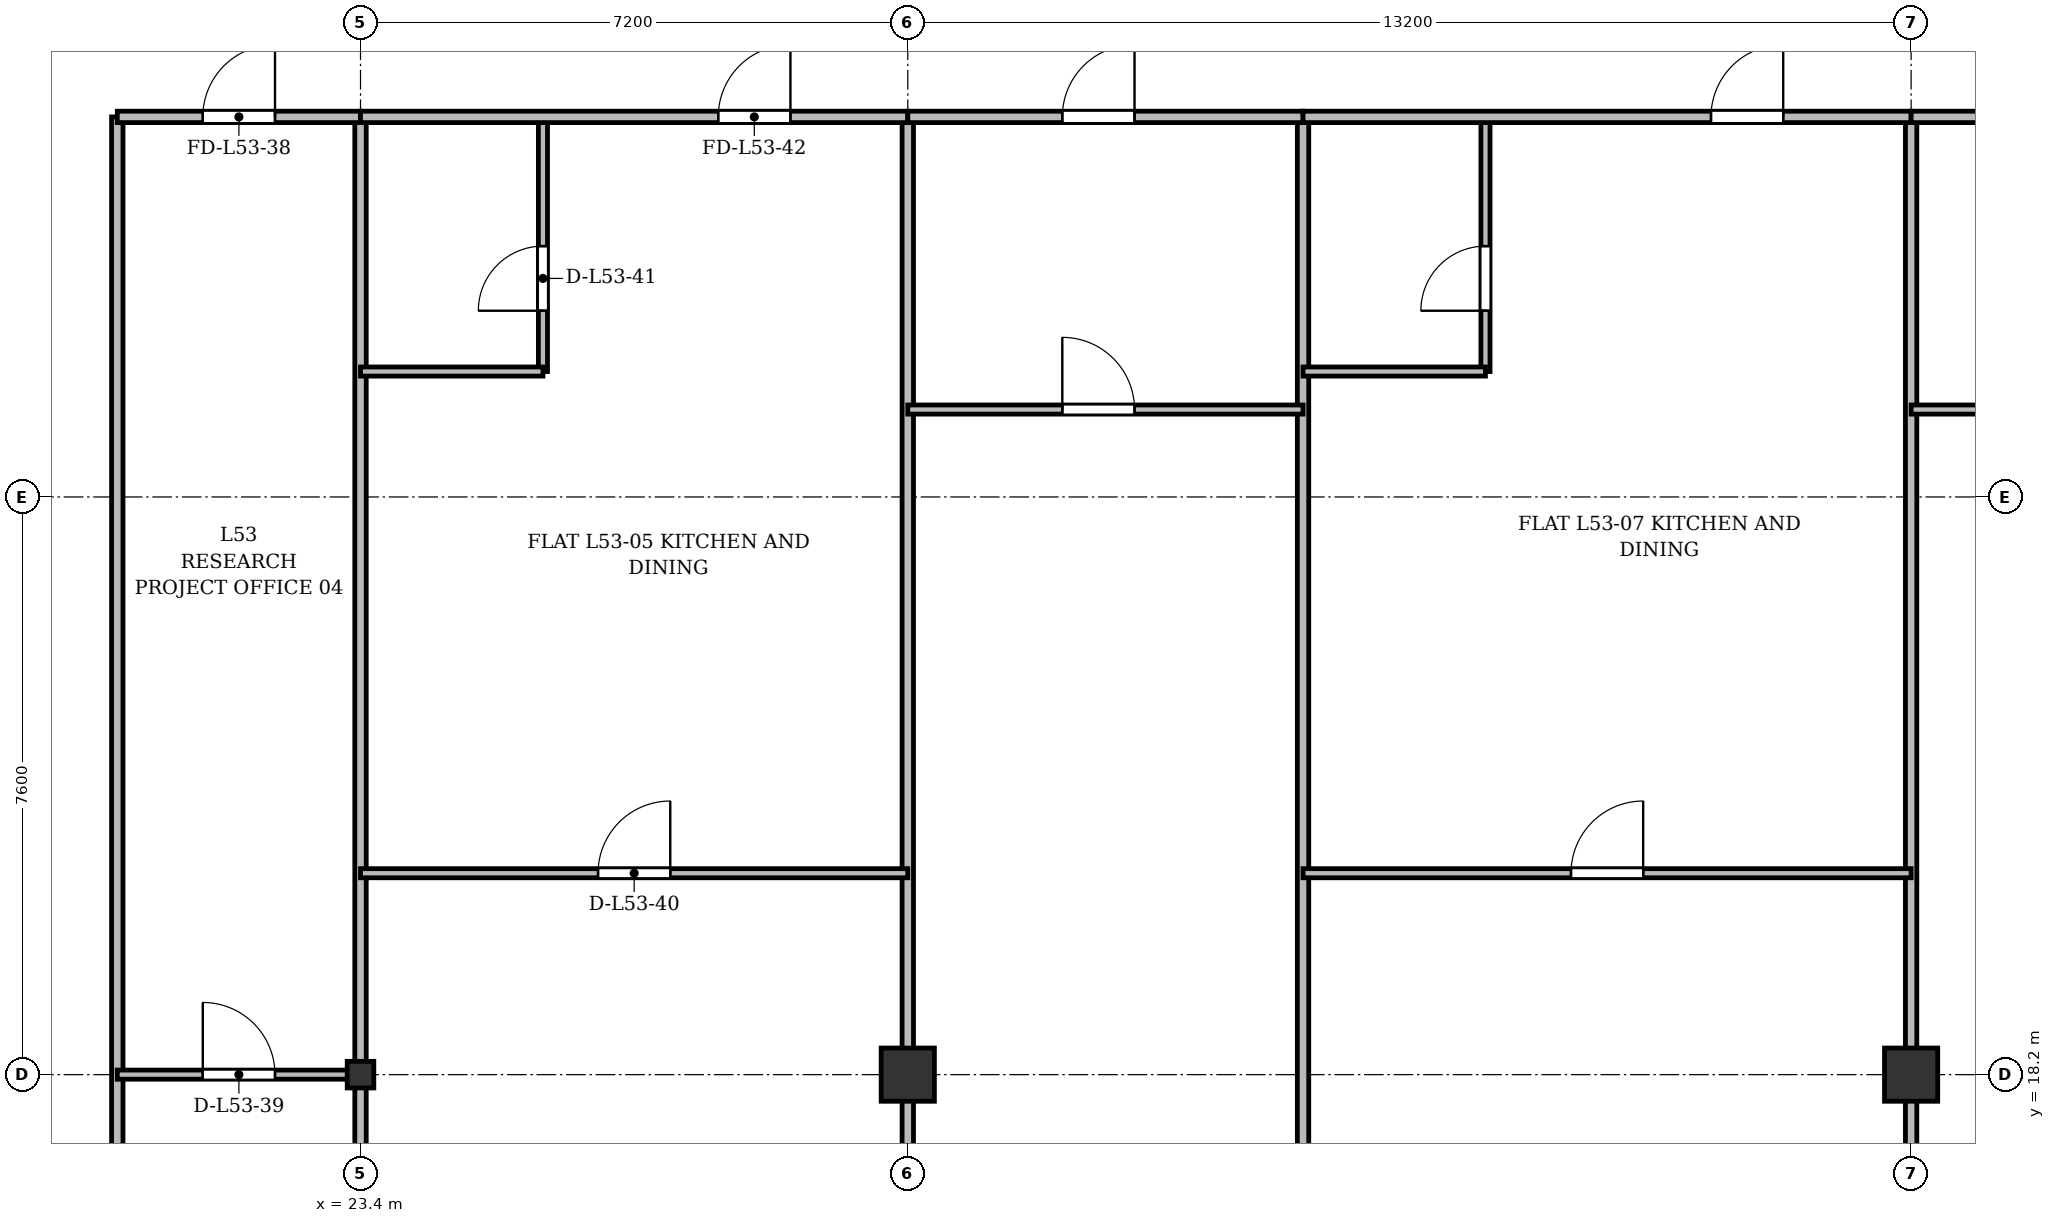
"""IFC4 building model, lengths in metres.
Left out: names, types, materials, properties, quantities, classifications, styles, units other than length and angle.
Written with IfcOpenShell. Run it as: python <this file> out.ifc"""

import sys

from ifc_helpers import new_model, si_unit, direction, frame, frame_2d, origin, origin_2d, place, context, subcontext, project, spatial, rectangle, i_section, extrude, source, transform, mapped, element, fill, save


model = new_model("IFC4")
c1 = context("Model", 3, precision=1e-05, world=origin(), true_north=direction((0.0, 1.0)))
c2 = subcontext(c1, "Body", "Model", "MODEL_VIEW")
j1 = project(units=[si_unit("LENGTHUNIT", "METRE"), si_unit("PLANEANGLEUNIT", "RADIAN")], contexts=[c1])
p1 = place(None, origin())
s1 = spatial("IfcSite", under=j1, at=p1, CompositionType="ELEMENT")
p2 = place(p1, origin())
s2 = spatial("IfcBuilding", under=s1, at=p2, CompositionType="ELEMENT")
p3 = place(p2, frame((0.0, 0.0, 204.9)))
s3 = spatial("IfcBuildingStorey", under=s2, at=p3, CompositionType="ELEMENT", Elevation=204.9)
m1 = source(origin(), c2, "Body", "SweptSolid", [
    extrude(i_section(OverallWidth=0.35, OverallDepth=0.35, WebThickness=0.018, FlangeThickness=0.028, at=origin_2d()), origin(), (0.0, 0.0, 1.0), 3.6),
])
p4 = place(p3, frame((23.4, 18.2, 0.0), z_axis=(0.0, 0.0, 1.0), x_axis=(1.0, 0.0, 0.0)))
e1 = element("IfcColumn", 1, at=p4, inside=s3, PredefinedType="COLUMN", context=c2, shape_type="MappedRepresentation", body=[
    mapped(m1, transform((0.0, 0.0, 0.0), x_axis=(1.0, 0.0, 0.0), y_axis=(0.0, 1.0, 0.0), z_axis=(0.0, 0.0, 1.0), scale=1.0)),
])
m2 = source(origin(), c2, "Body", "SweptSolid", [
    extrude(rectangle(XDim=0.7, YDim=0.7, at=origin_2d()), origin(), (0.0, 0.0, 1.0), 3.6),
])
for number, where, z_axis, x_axis in (
    (2, (30.6, 18.2, 0.0), (0.0, 0.0, 1.0), (1.0, 0.0, 0.0)),
    (3, (43.8, 18.2, 0.0), (0.0, 0.0, 1.0), (1.0, 0.0, 0.0)),
):
    element("IfcColumn", number, at=place(p3, frame(where, z_axis=z_axis, x_axis=x_axis)), inside=s3, PredefinedType="COLUMN", context=c2, shape_type="MappedRepresentation", body=[
        mapped(m2, transform((0.0, 0.0, 0.0), x_axis=(1.0, 0.0, 0.0), y_axis=(0.0, 1.0, 0.0), z_axis=(0.0, 0.0, 1.0), scale=1.0)),
    ])
for number, where, z_axis, x_axis in (
    (4, (23.4, 3.625, 0.0), (0.0, 0.0, 1.0), (0.0, 1.0, 0.0)),
    (5, (30.6, 3.625, 0.0), (0.0, 0.0, 1.0), (0.0, 1.0, 0.0)),
):
    element("IfcWall", number, at=place(p3, frame(where, z_axis=z_axis, x_axis=x_axis)), inside=s3, PredefinedType="PARTITIONING", context=c2, shape_type="SweptSolid", body=[
        extrude(rectangle(XDim=27.175, YDim=0.15, at=frame_2d((13.587, 0.0))), origin(), (0.0, 0.0, 1.0), 2.86),
    ])
p5 = place(p3, frame((35.8, 3.625, 0.0), z_axis=(0.0, 0.0, 1.0), x_axis=(0.0, 1.0, 0.0)))
e6 = element("IfcWall", 6, at=p5, inside=s3, PredefinedType="PARTITIONING", context=c2, shape_type="SweptSolid", body=[
    extrude(rectangle(XDim=27.175, YDim=0.15, at=frame_2d((13.587, 0.0))), origin(), (0.0, 0.0, 1.0), 2.91),
])
p6 = place(p3, frame((43.8, 3.625, 0.0), z_axis=(0.0, 0.0, 1.0), x_axis=(0.0, 1.0, 0.0)))
e7 = element("IfcWall", 7, at=p6, inside=s3, PredefinedType="PARTITIONING", context=c2, shape_type="SweptSolid", body=[
    extrude(rectangle(XDim=27.175, YDim=0.15, at=frame_2d((13.587, 0.0))), origin(), (0.0, 0.0, 1.0), 2.86),
])
p7 = place(p3, frame((20.2, 3.625, 0.0), z_axis=(0.0, 0.0, 1.0), x_axis=(0.0, 1.0, 0.0)))
e8 = element("IfcWall", 8, at=p7, inside=s3, PredefinedType="PARTITIONING", context=c2, shape_type="SweptSolid", body=[
    extrude(rectangle(XDim=27.175, YDim=0.15, at=frame_2d((13.587, 0.0))), origin(), (0.0, 0.0, 1.0), 2.91),
])
p8 = place(p3, frame((20.2, 30.8, 0.0), z_axis=(0.0, 0.0, 1.0), x_axis=(1.0, 0.0, 0.0)))
e9 = element("IfcWall", 9, at=p8, inside=s3, PredefinedType="PARTITIONING", context=c2, shape_type="SweptSolid", body=[
    extrude(rectangle(XDim=3.2, YDim=0.15, at=frame_2d((1.6, 0.0))), origin(), (0.0, 0.0, 1.0), 2.86),
])
p9 = place(p8, frame((1.125, 0.0, 0.0)))
e10 = element("IfcOpeningElement", 10, at=p9, cuts=e9, PredefinedType="OPENING", context=c2, shape_type="SweptSolid", body=[
    extrude(rectangle(XDim=0.95, YDim=2.15, at=frame_2d((0.475, 1.075))), frame((0.0, 0.085, 0.0), z_axis=(0.0, -1.0, 0.0), x_axis=(1.0, 0.0, 0.0)), (0.0, 0.0, 1.0), 0.17),
])
p10 = place(p3, frame((20.2, 18.2, 0.0), z_axis=(0.0, 0.0, 1.0), x_axis=(1.0, 0.0, 0.0)))
e11 = element("IfcWall", 11, at=p10, inside=s3, PredefinedType="PARTITIONING", context=c2, shape_type="SweptSolid", body=[
    extrude(rectangle(XDim=3.2, YDim=0.12, at=frame_2d((1.6, 0.0))), origin(), (0.0, 0.0, 1.0), 2.91),
])
p11 = place(p10, frame((1.125, 0.0, 0.0)))
e12 = element("IfcOpeningElement", 12, at=p11, cuts=e11, PredefinedType="OPENING", context=c2, shape_type="SweptSolid", body=[
    extrude(rectangle(XDim=0.95, YDim=2.15, at=frame_2d((0.475, 1.075))), frame((0.0, 0.07, 0.0), z_axis=(0.0, -1.0, 0.0), x_axis=(1.0, 0.0, 0.0)), (0.0, 0.0, 1.0), 0.14),
])
p12 = place(p3, frame((23.4, 20.85, 0.0), z_axis=(0.0, 0.0, 1.0), x_axis=(1.0, 0.0, 0.0)))
e13 = element("IfcWall", 13, at=p12, inside=s3, PredefinedType="PARTITIONING", context=c2, shape_type="SweptSolid", body=[
    extrude(rectangle(XDim=7.2, YDim=0.12, at=frame_2d((3.6, 0.0))), origin(), (0.0, 0.0, 1.0), 2.86),
])
p13 = place(p12, frame((3.125, 0.0, 0.0)))
e14 = element("IfcOpeningElement", 14, at=p13, cuts=e13, PredefinedType="OPENING", context=c2, shape_type="SweptSolid", body=[
    extrude(rectangle(XDim=0.95, YDim=2.15, at=frame_2d((0.475, 1.075))), frame((0.0, 0.07, 0.0), z_axis=(0.0, -1.0, 0.0), x_axis=(1.0, 0.0, 0.0)), (0.0, 0.0, 1.0), 0.14),
])
p14 = place(p3, frame((25.8, 27.45, 0.0), z_axis=(0.0, 0.0, 1.0), x_axis=(0.0, 1.0, 0.0)))
e15 = element("IfcWall", 15, at=p14, inside=s3, PredefinedType="PARTITIONING", context=c2, shape_type="SweptSolid", body=[
    extrude(rectangle(XDim=3.35, YDim=0.12, at=frame_2d((1.675, 0.0))), origin(), (0.0, 0.0, 1.0), 3.36),
])
p15 = place(p14, frame((0.8, 0.0, 0.0)))
e16 = element("IfcOpeningElement", 16, at=p15, cuts=e15, PredefinedType="OPENING", context=c2, shape_type="SweptSolid", body=[
    extrude(rectangle(XDim=0.85, YDim=2.1, at=frame_2d((0.425, 1.05))), frame((0.0, 0.07, 0.0), z_axis=(0.0, -1.0, 0.0), x_axis=(1.0, 0.0, 0.0)), (0.0, 0.0, 1.0), 0.14),
])
p16 = place(p3, frame((23.4, 27.45, 0.0), z_axis=(0.0, 0.0, 1.0), x_axis=(1.0, 0.0, 0.0)))
e17 = element("IfcWall", 17, at=p16, inside=s3, PredefinedType="PARTITIONING", context=c2, shape_type="SweptSolid", body=[
    extrude(rectangle(XDim=2.4, YDim=0.12, at=frame_2d((1.2, 0.0))), origin(), (0.0, 0.0, 1.0), 2.86),
])
p17 = place(p3, frame((23.4, 30.8, 0.0), z_axis=(0.0, 0.0, 1.0), x_axis=(1.0, 0.0, 0.0)))
e18 = element("IfcWall", 18, at=p17, inside=s3, PredefinedType="PARTITIONING", context=c2, shape_type="SweptSolid", body=[
    extrude(rectangle(XDim=7.2, YDim=0.15, at=frame_2d((3.6, 0.0))), origin(), (0.0, 0.0, 1.0), 2.86),
])
p18 = place(p17, frame((4.706, 0.0, 0.0)))
e19 = element("IfcOpeningElement", 19, at=p18, cuts=e18, PredefinedType="OPENING", context=c2, shape_type="SweptSolid", body=[
    extrude(rectangle(XDim=0.95, YDim=2.15, at=frame_2d((0.475, 1.075))), frame((0.0, 0.085, 0.0), z_axis=(0.0, -1.0, 0.0), x_axis=(1.0, 0.0, 0.0)), (0.0, 0.0, 1.0), 0.17),
])
p19 = place(p3, frame((30.6, 30.8, 0.0), z_axis=(0.0, 0.0, 1.0), x_axis=(1.0, 0.0, 0.0)))
e20 = element("IfcWall", 20, at=p19, inside=s3, PredefinedType="PARTITIONING", context=c2, shape_type="SweptSolid", body=[
    extrude(rectangle(XDim=5.2, YDim=0.15, at=frame_2d((2.6, 0.0))), origin(), (0.0, 0.0, 1.0), 2.86),
])
p20 = place(p19, frame((2.033, 0.0, 0.0)))
e21 = element("IfcOpeningElement", 21, at=p20, cuts=e20, PredefinedType="OPENING", context=c2, shape_type="SweptSolid", body=[
    extrude(rectangle(XDim=0.95, YDim=2.15, at=frame_2d((0.475, 1.075))), frame((0.0, 0.085, 0.0), z_axis=(0.0, -1.0, 0.0), x_axis=(1.0, 0.0, 0.0)), (0.0, 0.0, 1.0), 0.17),
])
p21 = place(p3, frame((30.6, 26.95, 0.0), z_axis=(0.0, 0.0, 1.0), x_axis=(1.0, 0.0, 0.0)))
e22 = element("IfcWall", 22, at=p21, inside=s3, PredefinedType="PARTITIONING", context=c2, shape_type="SweptSolid", body=[
    extrude(rectangle(XDim=5.2, YDim=0.12, at=frame_2d((2.6, 0.0))), origin(), (0.0, 0.0, 1.0), 2.86),
])
p22 = place(p21, frame((2.033, 0.0, 0.0)))
e23 = element("IfcOpeningElement", 23, at=p22, cuts=e22, PredefinedType="OPENING", context=c2, shape_type="SweptSolid", body=[
    extrude(rectangle(XDim=0.95, YDim=2.15, at=frame_2d((0.475, 1.075))), frame((0.0, 0.07, 0.0), z_axis=(0.0, -1.0, 0.0), x_axis=(1.0, 0.0, 0.0)), (0.0, 0.0, 1.0), 0.14),
])
p23 = place(p3, frame((35.8, 20.85, 0.0), z_axis=(0.0, 0.0, 1.0), x_axis=(1.0, 0.0, 0.0)))
e24 = element("IfcWall", 24, at=p23, inside=s3, PredefinedType="PARTITIONING", context=c2, shape_type="SweptSolid", body=[
    extrude(rectangle(XDim=8.0, YDim=0.12, at=frame_2d((4.0, 0.0))), origin(), (0.0, 0.0, 1.0), 2.86),
])
p24 = place(p23, frame((3.525, 0.0, 0.0)))
e25 = element("IfcOpeningElement", 25, at=p24, cuts=e24, PredefinedType="OPENING", context=c2, shape_type="SweptSolid", body=[
    extrude(rectangle(XDim=0.95, YDim=2.15, at=frame_2d((0.475, 1.075))), frame((0.0, 0.07, 0.0), z_axis=(0.0, -1.0, 0.0), x_axis=(1.0, 0.0, 0.0)), (0.0, 0.0, 1.0), 0.14),
])
p25 = place(p3, frame((38.2, 27.45, 0.0), z_axis=(0.0, 0.0, 1.0), x_axis=(0.0, 1.0, 0.0)))
e26 = element("IfcWall", 26, at=p25, inside=s3, PredefinedType="PARTITIONING", context=c2, shape_type="SweptSolid", body=[
    extrude(rectangle(XDim=3.35, YDim=0.12, at=frame_2d((1.675, 0.0))), origin(), (0.0, 0.0, 1.0), 3.36),
])
p26 = place(p25, frame((0.8, 0.0, 0.0)))
e27 = element("IfcOpeningElement", 27, at=p26, cuts=e26, PredefinedType="OPENING", context=c2, shape_type="SweptSolid", body=[
    extrude(rectangle(XDim=0.85, YDim=2.1, at=frame_2d((0.425, 1.05))), frame((0.0, 0.07, 0.0), z_axis=(0.0, -1.0, 0.0), x_axis=(1.0, 0.0, 0.0)), (0.0, 0.0, 1.0), 0.14),
])
p27 = place(p3, frame((35.8, 27.45, 0.0), z_axis=(0.0, 0.0, 1.0), x_axis=(1.0, 0.0, 0.0)))
e28 = element("IfcWall", 28, at=p27, inside=s3, PredefinedType="PARTITIONING", context=c2, shape_type="SweptSolid", body=[
    extrude(rectangle(XDim=2.4, YDim=0.12, at=frame_2d((1.2, 0.0))), origin(), (0.0, 0.0, 1.0), 3.36),
])
p28 = place(p3, frame((35.8, 30.8, 0.0), z_axis=(0.0, 0.0, 1.0), x_axis=(1.0, 0.0, 0.0)))
e29 = element("IfcWall", 29, at=p28, inside=s3, PredefinedType="PARTITIONING", context=c2, shape_type="SweptSolid", body=[
    extrude(rectangle(XDim=8.0, YDim=0.15, at=frame_2d((4.0, 0.0))), origin(), (0.0, 0.0, 1.0), 2.86),
])
p29 = place(p28, frame((5.367, 0.0, 0.0)))
e30 = element("IfcOpeningElement", 30, at=p29, cuts=e29, PredefinedType="OPENING", context=c2, shape_type="SweptSolid", body=[
    extrude(rectangle(XDim=0.95, YDim=2.15, at=frame_2d((0.475, 1.075))), frame((0.0, 0.085, 0.0), z_axis=(0.0, -1.0, 0.0), x_axis=(1.0, 0.0, 0.0)), (0.0, 0.0, 1.0), 0.17),
])
p30 = place(p3, frame((43.8, 30.8, 0.0), z_axis=(0.0, 0.0, 1.0), x_axis=(1.0, 0.0, 0.0)))
e31 = element("IfcWall", 31, at=p30, inside=s3, PredefinedType="PARTITIONING", context=c2, shape_type="SweptSolid", body=[
    extrude(rectangle(XDim=7.2, YDim=0.15, at=frame_2d((3.6, 0.0))), origin(), (0.0, 0.0, 1.0), 2.86),
])
p31 = place(p30, frame((3.125, 0.0, 0.0)))
e32 = element("IfcOpeningElement", 32, at=p31, cuts=e31, PredefinedType="OPENING", context=c2, shape_type="SweptSolid", body=[
    extrude(rectangle(XDim=0.95, YDim=2.15, at=frame_2d((0.475, 1.075))), frame((0.0, 0.085, 0.0), z_axis=(0.0, -1.0, 0.0), x_axis=(1.0, 0.0, 0.0)), (0.0, 0.0, 1.0), 0.17),
])
p32 = place(p3, frame((43.8, 26.95, 0.0), z_axis=(0.0, 0.0, 1.0), x_axis=(1.0, 0.0, 0.0)))
e33 = element("IfcWall", 33, at=p32, inside=s3, PredefinedType="PARTITIONING", context=c2, shape_type="SweptSolid", body=[
    extrude(rectangle(XDim=7.2, YDim=0.12, at=frame_2d((3.6, 0.0))), origin(), (0.0, 0.0, 1.0), 2.86),
])
p33 = place(p32, frame((3.125, 0.0, 0.0)))
e34 = element("IfcOpeningElement", 34, at=p33, cuts=e33, PredefinedType="OPENING", context=c2, shape_type="SweptSolid", body=[
    extrude(rectangle(XDim=0.95, YDim=2.15, at=frame_2d((0.475, 1.075))), frame((0.0, 0.07, 0.0), z_axis=(0.0, -1.0, 0.0), x_axis=(1.0, 0.0, 0.0)), (0.0, 0.0, 1.0), 0.14),
])
m3 = source(origin(), c2, "Body", "SweptSolid", [
    extrude(rectangle(XDim=0.95, YDim=2.15, at=frame_2d((0.475, 1.075))), frame((0.0, 0.025, 0.0), z_axis=(0.0, -1.0, 0.0), x_axis=(1.0, 0.0, 0.0)), (0.0, 0.0, 1.0), 0.05),
])
p34 = place(p9, origin())
e35 = element("IfcDoor", 35, at=p34, inside=s3, OperationType="SINGLE_SWING_RIGHT", PredefinedType="DOOR", context=c2, shape_type="MappedRepresentation", body=[
    mapped(m3, transform((0.0, 0.0, 0.0), x_axis=(1.0, 0.0, 0.0), y_axis=(0.0, 1.0, 0.0), z_axis=(0.0, 0.0, 1.0), scale=1.0)),
])
fill(e10, e35)
p35 = place(p11, origin())
e36 = element("IfcDoor", 36, at=p35, inside=s3, OperationType="SINGLE_SWING_LEFT", PredefinedType="DOOR", context=c2, shape_type="MappedRepresentation", body=[
    mapped(m3, transform((0.0, 0.0, 0.0), x_axis=(1.0, 0.0, 0.0), y_axis=(0.0, 1.0, 0.0), z_axis=(0.0, 0.0, 1.0), scale=1.0)),
])
fill(e12, e36)
p36 = place(p13, origin())
e37 = element("IfcDoor", 37, at=p36, inside=s3, OperationType="SINGLE_SWING_RIGHT", PredefinedType="DOOR", context=c2, shape_type="MappedRepresentation", body=[
    mapped(m3, transform((0.0, 0.0, 0.0), x_axis=(1.0, 0.0, 0.0), y_axis=(0.0, 1.0, 0.0), z_axis=(0.0, 0.0, 1.0), scale=1.0)),
])
fill(e14, e37)
m4 = source(origin(), c2, "Body", "SweptSolid", [
    extrude(rectangle(XDim=0.85, YDim=2.1, at=frame_2d((0.425, 1.05))), frame((0.0, 0.025, 0.0), z_axis=(0.0, -1.0, 0.0), x_axis=(1.0, 0.0, 0.0)), (0.0, 0.0, 1.0), 0.05),
])
p37 = place(p15, origin())
e38 = element("IfcDoor", 38, at=p37, inside=s3, OperationType="SINGLE_SWING_LEFT", PredefinedType="DOOR", context=c2, shape_type="MappedRepresentation", body=[
    mapped(m4, transform((0.0, 0.0, 0.0), x_axis=(1.0, 0.0, 0.0), y_axis=(0.0, 1.0, 0.0), z_axis=(0.0, 0.0, 1.0), scale=1.0)),
])
fill(e16, e38)
p38 = place(p18, origin())
e39 = element("IfcDoor", 39, at=p38, inside=s3, OperationType="SINGLE_SWING_RIGHT", PredefinedType="DOOR", context=c2, shape_type="MappedRepresentation", body=[
    mapped(m3, transform((0.0, 0.0, 0.0), x_axis=(1.0, 0.0, 0.0), y_axis=(0.0, 1.0, 0.0), z_axis=(0.0, 0.0, 1.0), scale=1.0)),
])
fill(e19, e39)
p39 = place(p20, origin())
e40 = element("IfcDoor", 40, at=p39, inside=s3, OperationType="SINGLE_SWING_RIGHT", PredefinedType="DOOR", context=c2, shape_type="MappedRepresentation", body=[
    mapped(m3, transform((0.0, 0.0, 0.0), x_axis=(1.0, 0.0, 0.0), y_axis=(0.0, 1.0, 0.0), z_axis=(0.0, 0.0, 1.0), scale=1.0)),
])
fill(e21, e40)
p40 = place(p22, origin())
e41 = element("IfcDoor", 41, at=p40, inside=s3, OperationType="SINGLE_SWING_LEFT", PredefinedType="DOOR", context=c2, shape_type="MappedRepresentation", body=[
    mapped(m3, transform((0.0, 0.0, 0.0), x_axis=(1.0, 0.0, 0.0), y_axis=(0.0, 1.0, 0.0), z_axis=(0.0, 0.0, 1.0), scale=1.0)),
])
fill(e23, e41)
p41 = place(p24, origin())
e42 = element("IfcDoor", 42, at=p41, inside=s3, OperationType="SINGLE_SWING_RIGHT", PredefinedType="DOOR", context=c2, shape_type="MappedRepresentation", body=[
    mapped(m3, transform((0.0, 0.0, 0.0), x_axis=(1.0, 0.0, 0.0), y_axis=(0.0, 1.0, 0.0), z_axis=(0.0, 0.0, 1.0), scale=1.0)),
])
fill(e25, e42)
p42 = place(p26, origin())
e43 = element("IfcDoor", 43, at=p42, inside=s3, OperationType="SINGLE_SWING_LEFT", PredefinedType="DOOR", context=c2, shape_type="MappedRepresentation", body=[
    mapped(m4, transform((0.0, 0.0, 0.0), x_axis=(1.0, 0.0, 0.0), y_axis=(0.0, 1.0, 0.0), z_axis=(0.0, 0.0, 1.0), scale=1.0)),
])
fill(e27, e43)
p43 = place(p29, origin())
e44 = element("IfcDoor", 44, at=p43, inside=s3, OperationType="SINGLE_SWING_RIGHT", PredefinedType="DOOR", context=c2, shape_type="MappedRepresentation", body=[
    mapped(m3, transform((0.0, 0.0, 0.0), x_axis=(1.0, 0.0, 0.0), y_axis=(0.0, 1.0, 0.0), z_axis=(0.0, 0.0, 1.0), scale=1.0)),
])
fill(e30, e44)
save(model, sys.argv[1])
